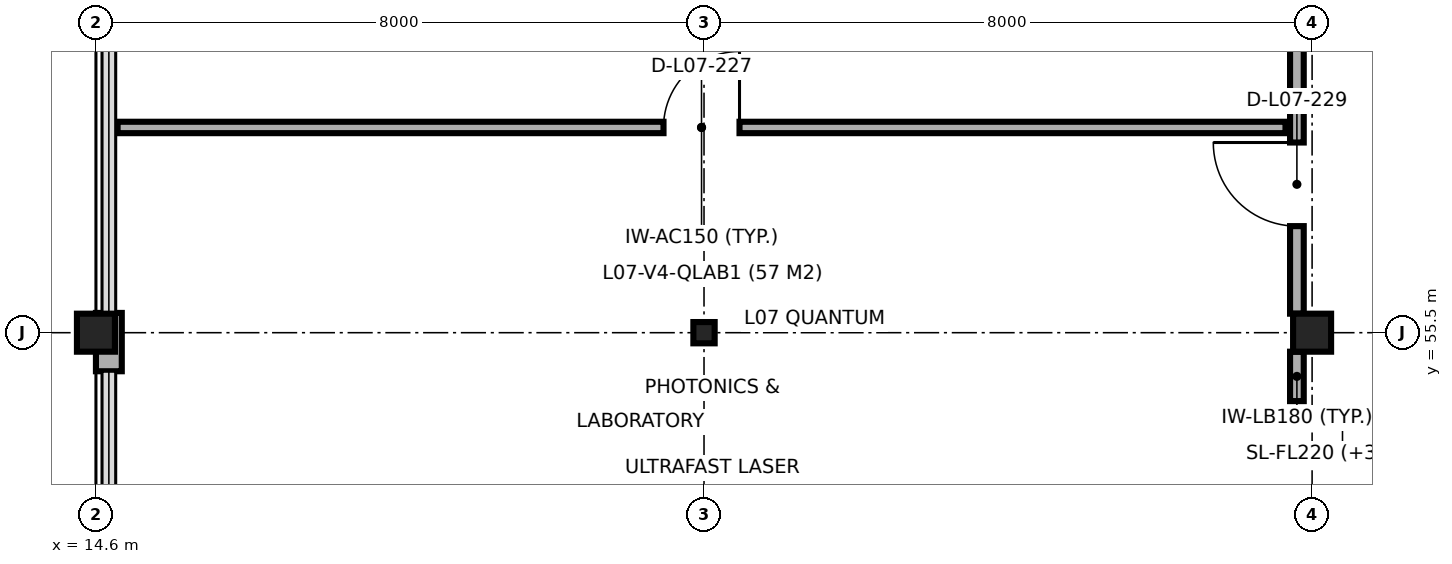
"""IFC4 building model, lengths in metres.
Left out: names, types, materials, properties, quantities, classifications, styles, units other than length and angle.
Written with IfcOpenShell. Run it as: python <this file> out.ifc"""

import sys

from ifc_helpers import new_model, si_unit, direction, frame, frame_2d, origin, origin_2d, place, context, subcontext, project, spatial, rectangle, i_section, extrude, element, fill, save


model = new_model("IFC4")
c1 = context("Model", 3, precision=1e-05, world=origin(), true_north=direction((0.0, 1.0)))
c2 = subcontext(c1, "Body", "Model", "MODEL_VIEW")
j1 = project(units=[si_unit("LENGTHUNIT", "METRE"), si_unit("PLANEANGLEUNIT", "RADIAN")], contexts=[c1])
p1 = place(None, origin())
s1 = spatial("IfcSite", under=j1, at=p1, CompositionType="ELEMENT")
p2 = place(p1, origin())
s2 = spatial("IfcBuilding", under=s1, at=p2, CompositionType="ELEMENT")
p3 = place(p2, frame((0.0, 0.0, 30.6)))
s3 = spatial("IfcBuildingStorey", under=s2, at=p3, CompositionType="ELEMENT", Elevation=30.6)
p4 = place(p3, frame((14.6, 55.5, 0.0), z_axis=(0.0, 0.0, 1.0), x_axis=(1.0, 0.0, 0.0)))
e1 = element("IfcColumn", 1, at=p4, inside=s3, PredefinedType="COLUMN", context=c2, shape_type="SweptSolid", body=[
    extrude(rectangle(XDim=0.5, YDim=0.5, at=origin_2d()), origin(), (0.0, 0.0, 1.0), 3.9),
])
p5 = place(p3, frame((22.6, 55.5, 0.0), z_axis=(0.0, 0.0, 1.0), x_axis=(1.0, 0.0, 0.0)))
e2 = element("IfcColumn", 2, at=p5, inside=s3, PredefinedType="COLUMN", context=c2, shape_type="SweptSolid", body=[
    extrude(i_section(OverallWidth=0.28, OverallDepth=0.28, WebThickness=0.01, FlangeThickness=0.018, FilletRadius=0.024, at=origin_2d()), origin(), (0.0, 0.0, 1.0), 3.9),
])
p6 = place(p3, frame((30.6, 55.5, 0.0), z_axis=(0.0, 0.0, 1.0), x_axis=(1.0, 0.0, 0.0)))
e3 = element("IfcColumn", 3, at=p6, inside=s3, PredefinedType="COLUMN", context=c2, shape_type="SweptSolid", body=[
    extrude(rectangle(XDim=0.5, YDim=0.5, at=origin_2d()), origin(), (0.0, 0.0, 1.0), 3.9),
])
p7 = place(p3, frame((14.77, 55.76, 0.0), z_axis=(0.0, 0.0, 1.0), x_axis=(0.0, -1.0, 0.0)))
e4 = element("IfcWall", 4, at=p7, inside=s3, PredefinedType="SOLIDWALL", context=c2, shape_type="SweptSolid", body=[
    extrude(rectangle(XDim=0.767, YDim=0.34, at=frame_2d((0.384, 0.0))), origin(), (0.0, 0.0, 1.0), 3.66),
])
p8 = place(p3, frame((14.885, 58.2, 0.0), z_axis=(0.0, 0.0, 1.0), x_axis=(1.0, 0.0, 0.0)))
e5 = element("IfcWall", 5, at=p8, inside=s3, PredefinedType="PARTITIONING", context=c2, shape_type="SweptSolid", body=[
    extrude(rectangle(XDim=15.365, YDim=0.15, at=frame_2d((7.683, 0.0))), origin(), (0.0, 0.0, 1.0), 3.7),
])
p9 = place(p8, frame((7.182, 0.0, 0.0)))
e6 = element("IfcOpeningElement", 6, at=p9, cuts=e5, PredefinedType="OPENING", context=c2, shape_type="SweptSolid", body=[
    extrude(rectangle(XDim=1.0, YDim=2.15, at=frame_2d((0.5, 1.075))), frame((0.0, 0.085, 0.0), z_axis=(0.0, -1.0, 0.0), x_axis=(1.0, 0.0, 0.0)), (0.0, 0.0, 1.0), 0.17),
])
p10 = place(p3, frame((30.4, 54.6, 0.0), z_axis=(0.0, 0.0, 1.0), x_axis=(0.0, 1.0, 0.0)))
e7 = element("IfcWall", 7, at=p10, inside=s3, PredefinedType="PARTITIONING", context=c2, shape_type="SweptSolid", body=[
    extrude(rectangle(XDim=0.65, YDim=0.18, at=frame_2d((0.325, 0.0))), origin(), (0.0, 0.0, 1.0), 3.26),
])
p11 = place(p3, frame((30.4, 55.75, 0.0), z_axis=(0.0, 0.0, 1.0), x_axis=(0.0, 1.0, 0.0)))
e8 = element("IfcWall", 8, at=p11, inside=s3, PredefinedType="PARTITIONING", context=c2, shape_type="SweptSolid", body=[
    extrude(rectangle(XDim=7.5, YDim=0.18, at=frame_2d((3.75, 0.0))), origin(), (0.0, 0.0, 1.0), 3.26),
])
p12 = place(p11, frame((1.152, 0.0, 0.0)))
e9 = element("IfcOpeningElement", 9, at=p12, cuts=e8, PredefinedType="OPENING", context=c2, shape_type="SweptSolid", body=[
    extrude(rectangle(XDim=1.1, YDim=2.15, at=frame_2d((0.55, 1.075))), frame((0.0, 0.1, 0.0), z_axis=(0.0, -1.0, 0.0), x_axis=(1.0, 0.0, 0.0)), (0.0, 0.0, 1.0), 0.2),
])
p13 = place(p9, origin())
e10 = element("IfcDoor", 10, at=p13, inside=s3, OperationType="SINGLE_SWING_RIGHT", PredefinedType="DOOR", context=c2, shape_type="SweptSolid", body=[
    extrude(rectangle(XDim=1.0, YDim=2.15, at=frame_2d((0.5, 1.075))), frame((0.0, 0.025, 0.0), z_axis=(0.0, -1.0, 0.0), x_axis=(1.0, 0.0, 0.0)), (0.0, 0.0, 1.0), 0.05),
])
fill(e6, e10)
p14 = place(p12, origin())
e11 = element("IfcDoor", 11, at=p14, inside=s3, OperationType="SINGLE_SWING_RIGHT", PredefinedType="DOOR", context=c2, shape_type="SweptSolid", body=[
    extrude(rectangle(XDim=1.1, YDim=2.15, at=frame_2d((0.55, 1.075))), frame((0.0, 0.025, 0.0), z_axis=(0.0, -1.0, 0.0), x_axis=(1.0, 0.0, 0.0)), (0.0, 0.0, 1.0), 0.05),
])
fill(e9, e11)
save(model, sys.argv[1])
